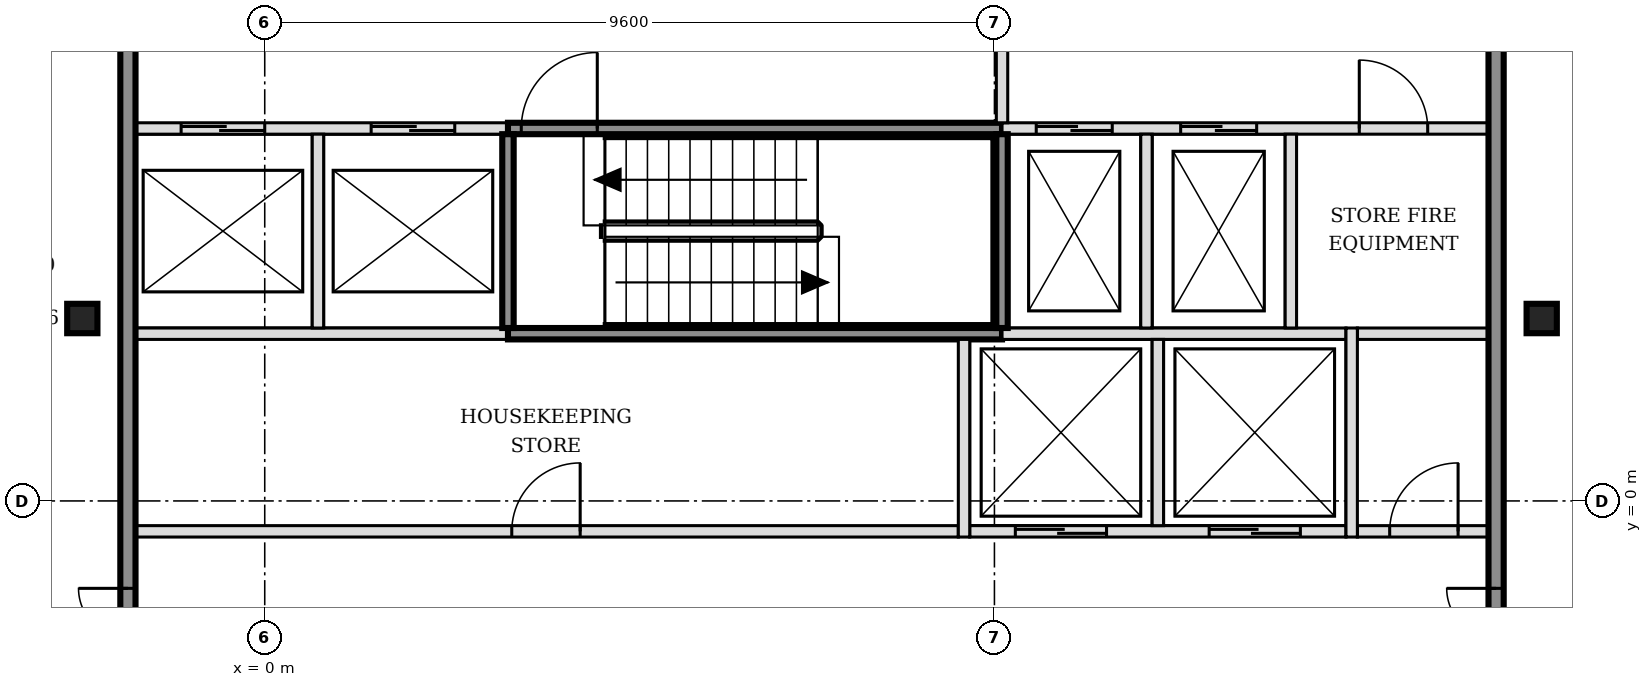
"""IFC4 building model, lengths in metres.
Left out: names, types, materials, properties, quantities, classifications, styles, units other than length and angle.
Written with IfcOpenShell. Run it as: python <this file> out.ifc"""

import sys

from ifc_helpers import new_model, si_unit, direction, frame, frame_2d, origin, origin_2d, place, context, subcontext, project, spatial, rectangle, i_section, extrude, element, fill, save


model = new_model("IFC4")
c1 = context("Model", 3, precision=1e-05, world=origin(), true_north=direction((0.0, 1.0)))
c2 = subcontext(c1, "Body", "Model", "MODEL_VIEW")
j1 = project(units=[si_unit("LENGTHUNIT", "METRE"), si_unit("PLANEANGLEUNIT", "RADIAN")], contexts=[c1])
p1 = place(None, origin())
s1 = spatial("IfcSite", under=j1, at=p1, CompositionType="ELEMENT")
p2 = place(p1, origin())
s2 = spatial("IfcBuilding", under=s1, at=p2, CompositionType="ELEMENT")
p3 = place(p2, frame((0.0, 0.0, 250.2)))
s3 = spatial("IfcBuildingStorey", under=s2, at=p3, CompositionType="ELEMENT", Elevation=250.2)
for number, where, z_axis, x_axis in (
    (1, (-2.4, 2.4, -0.15), (0.0, 0.0, 1.0), (1.0, 0.0, 0.0)),
    (2, (16.8, 2.4, -0.15), (0.0, 0.0, 1.0), (1.0, 0.0, 0.0)),
):
    element("IfcColumn", number, at=place(p3, frame(where, z_axis=z_axis, x_axis=x_axis)), inside=s3, PredefinedType="COLUMN", context=c2, shape_type="SweptSolid", body=[
        extrude(i_section(OverallWidth=0.398, OverallDepth=0.387, WebThickness=0.021, FlangeThickness=0.033, FilletRadius=0.015, at=origin_2d()), origin(), (0.0, 0.0, 1.0), 3.6),
    ])
p4 = place(p3, frame((-1.7, -0.4, 0.0), z_axis=(0.0, 0.0, 1.0), x_axis=(1.0, 0.0, 0.0)))
e3 = element("IfcWall", 3, at=p4, inside=s3, PredefinedType="PARTITIONING", context=c2, shape_type="SweptSolid", body=[
    extrude(rectangle(XDim=10.825, YDim=0.15, at=frame_2d((5.413, 0.0))), origin(), (0.0, 0.0, 1.0), 3.45),
])
p5 = place(p4, frame((4.95, 0.0, 0.0)))
e4 = element("IfcOpeningElement", 4, at=p5, cuts=e3, PredefinedType="OPENING", context=c2, shape_type="SweptSolid", body=[
    extrude(rectangle(XDim=0.9, YDim=2.1, at=frame_2d((0.45, 1.05))), frame((0.0, 0.085, 0.0), z_axis=(0.0, -1.0, 0.0), x_axis=(1.0, 0.0, 0.0)), (0.0, 0.0, 1.0), 0.17),
])
p6 = place(p3, frame((9.275, -0.4, 0.0), z_axis=(0.0, 0.0, 1.0), x_axis=(1.0, 0.0, 0.0)))
e5 = element("IfcWall", 5, at=p6, inside=s3, PredefinedType="SOLIDWALL", context=c2, shape_type="SweptSolid", body=[
    extrude(rectangle(XDim=4.95, YDim=0.15, at=frame_2d((2.475, 0.0))), origin(), (0.0, 0.0, 1.0), 3.45),
])
p7 = place(p6, frame((0.6, 0.0, 0.0)))
e6 = element("IfcOpeningElement", 6, at=p7, cuts=e5, PredefinedType="OPENING", context=c2, shape_type="SweptSolid", body=[
    extrude(rectangle(XDim=1.2, YDim=2.1, at=frame_2d((0.6, 1.05))), frame((0.0, 0.085, 0.0), z_axis=(0.0, -1.0, 0.0), x_axis=(1.0, 0.0, 0.0)), (0.0, 0.0, 1.0), 0.17),
])
p8 = place(p6, frame((3.15, 0.0, 0.0)))
e7 = element("IfcOpeningElement", 7, at=p8, cuts=e5, PredefinedType="OPENING", context=c2, shape_type="SweptSolid", body=[
    extrude(rectangle(XDim=1.2, YDim=2.1, at=frame_2d((0.6, 1.05))), frame((0.0, 0.085, 0.0), z_axis=(0.0, -1.0, 0.0), x_axis=(1.0, 0.0, 0.0)), (0.0, 0.0, 1.0), 0.17),
])
p9 = place(p3, frame((14.375, -0.4, 0.0), z_axis=(0.0, 0.0, 1.0), x_axis=(1.0, 0.0, 0.0)))
e8 = element("IfcWall", 8, at=p9, inside=s3, PredefinedType="PARTITIONING", context=c2, shape_type="SweptSolid", body=[
    extrude(rectangle(XDim=1.725, YDim=0.15, at=frame_2d((0.863, 0.0))), origin(), (0.0, 0.0, 1.0), 3.45),
])
p10 = place(p9, frame((0.425, 0.0, 0.0)))
e9 = element("IfcOpeningElement", 9, at=p10, cuts=e8, PredefinedType="OPENING", context=c2, shape_type="SweptSolid", body=[
    extrude(rectangle(XDim=0.9, YDim=2.1, at=frame_2d((0.45, 1.05))), frame((0.0, 0.085, 0.0), z_axis=(0.0, -1.0, 0.0), x_axis=(1.0, 0.0, 0.0)), (0.0, 0.0, 1.0), 0.17),
])
p11 = place(p3, frame((-1.7, 2.2, 0.0), z_axis=(0.0, 0.0, 1.0), x_axis=(1.0, 0.0, 0.0)))
e10 = element("IfcWall", 10, at=p11, inside=s3, PredefinedType="SOLIDWALL", context=c2, shape_type="SweptSolid", body=[
    extrude(rectangle(XDim=4.9, YDim=0.15, at=frame_2d((2.45, 0.0))), origin(), (0.0, 0.0, 1.0), 3.45),
])
p12 = place(p3, frame((3.2, 2.2, 0.0), z_axis=(0.0, 0.0, 1.0), x_axis=(1.0, 0.0, 0.0)))
e11 = element("IfcWall", 11, at=p12, inside=s3, PredefinedType="SOLIDWALL", context=c2, shape_type="SweptSolid", body=[
    extrude(rectangle(XDim=6.5, YDim=0.15, at=frame_2d((3.25, 0.0))), origin(), (0.0, 0.0, 1.0), 3.45),
])
p13 = place(p3, frame((9.7, 2.2, 0.0), z_axis=(0.0, 0.0, 1.0), x_axis=(1.0, 0.0, 0.0)))
e12 = element("IfcWall", 12, at=p13, inside=s3, PredefinedType="SOLIDWALL", context=c2, shape_type="SweptSolid", body=[
    extrude(rectangle(XDim=4.525, YDim=0.15, at=frame_2d((2.263, 0.0))), origin(), (0.0, 0.0, 1.0), 3.45),
])
p14 = place(p3, frame((14.375, 2.2, 0.0), z_axis=(0.0, 0.0, 1.0), x_axis=(1.0, 0.0, 0.0)))
e13 = element("IfcWall", 13, at=p14, inside=s3, PredefinedType="PARTITIONING", context=c2, shape_type="SweptSolid", body=[
    extrude(rectangle(XDim=1.725, YDim=0.15, at=frame_2d((0.863, 0.0))), origin(), (0.0, 0.0, 1.0), 3.45),
])
p15 = place(p3, frame((-1.7, 4.9, 0.0), z_axis=(0.0, 0.0, 1.0), x_axis=(1.0, 0.0, 0.0)))
e14 = element("IfcWall", 14, at=p15, inside=s3, PredefinedType="SOLIDWALL", context=c2, shape_type="SweptSolid", body=[
    extrude(rectangle(XDim=4.9, YDim=0.15, at=frame_2d((2.45, 0.0))), origin(), (0.0, 0.0, 1.0), 3.45),
])
p16 = place(p15, frame((0.6, 0.0, 0.0)))
e15 = element("IfcOpeningElement", 15, at=p16, cuts=e14, PredefinedType="OPENING", context=c2, shape_type="SweptSolid", body=[
    extrude(rectangle(XDim=1.1, YDim=2.1, at=frame_2d((0.55, 1.05))), frame((0.0, 0.085, 0.0), z_axis=(0.0, -1.0, 0.0), x_axis=(1.0, 0.0, 0.0)), (0.0, 0.0, 1.0), 0.17),
])
p17 = place(p15, frame((3.1, 0.0, 0.0)))
e16 = element("IfcOpeningElement", 16, at=p17, cuts=e14, PredefinedType="OPENING", context=c2, shape_type="SweptSolid", body=[
    extrude(rectangle(XDim=1.1, YDim=2.1, at=frame_2d((0.55, 1.05))), frame((0.0, 0.085, 0.0), z_axis=(0.0, -1.0, 0.0), x_axis=(1.0, 0.0, 0.0)), (0.0, 0.0, 1.0), 0.17),
])
p18 = place(p3, frame((3.2, 4.9, 0.0), z_axis=(0.0, 0.0, 1.0), x_axis=(1.0, 0.0, 0.0)))
e17 = element("IfcWall", 17, at=p18, inside=s3, PredefinedType="SOLIDWALL", context=c2, shape_type="SweptSolid", body=[
    extrude(rectangle(XDim=6.5, YDim=0.15, at=frame_2d((3.25, 0.0))), origin(), (0.0, 0.0, 1.0), 3.45),
])
p19 = place(p18, frame((0.175, 0.0, 0.0)))
e18 = element("IfcOpeningElement", 18, at=p19, cuts=e17, PredefinedType="OPENING", context=c2, shape_type="SweptSolid", body=[
    extrude(rectangle(XDim=1.0, YDim=2.1, at=frame_2d((0.5, 1.05))), frame((0.0, 0.085, 0.0), z_axis=(0.0, -1.0, 0.0), x_axis=(1.0, 0.0, 0.0)), (0.0, 0.0, 1.0), 0.17),
])
p20 = place(p3, frame((9.7, 4.9, 0.0), z_axis=(0.0, 0.0, 1.0), x_axis=(1.0, 0.0, 0.0)))
e19 = element("IfcWall", 19, at=p20, inside=s3, PredefinedType="SOLIDWALL", context=c2, shape_type="SweptSolid", body=[
    extrude(rectangle(XDim=6.4, YDim=0.15, at=frame_2d((3.2, 0.0))), origin(), (0.0, 0.0, 1.0), 3.45),
])
p21 = place(p20, frame((0.45, 0.0, 0.0)))
e20 = element("IfcOpeningElement", 20, at=p21, cuts=e19, PredefinedType="OPENING", context=c2, shape_type="SweptSolid", body=[
    extrude(rectangle(XDim=1.0, YDim=2.1, at=frame_2d((0.5, 1.05))), frame((0.0, 0.085, 0.0), z_axis=(0.0, -1.0, 0.0), x_axis=(1.0, 0.0, 0.0)), (0.0, 0.0, 1.0), 0.17),
])
p22 = place(p20, frame((2.35, 0.0, 0.0)))
e21 = element("IfcOpeningElement", 21, at=p22, cuts=e19, PredefinedType="OPENING", context=c2, shape_type="SweptSolid", body=[
    extrude(rectangle(XDim=1.0, YDim=2.1, at=frame_2d((0.5, 1.05))), frame((0.0, 0.085, 0.0), z_axis=(0.0, -1.0, 0.0), x_axis=(1.0, 0.0, 0.0)), (0.0, 0.0, 1.0), 0.17),
])
p23 = place(p20, frame((4.7, 0.0, 0.0)))
e22 = element("IfcOpeningElement", 22, at=p23, cuts=e19, PredefinedType="OPENING", context=c2, shape_type="SweptSolid", body=[
    extrude(rectangle(XDim=0.9, YDim=2.1, at=frame_2d((0.45, 1.05))), frame((0.0, 0.085, 0.0), z_axis=(0.0, -1.0, 0.0), x_axis=(1.0, 0.0, 0.0)), (0.0, 0.0, 1.0), 0.17),
])
p24 = place(p3, frame((-1.8, -5.5, 0.0), z_axis=(0.0, 0.0, 1.0), x_axis=(0.0, 1.0, 0.0)))
e23 = element("IfcWall", 23, at=p24, inside=s3, PredefinedType="SOLIDWALL", context=c2, shape_type="SweptSolid", body=[
    extrude(rectangle(XDim=15.8, YDim=0.2, at=frame_2d((7.9, 0.0))), origin(), (0.0, 0.0, 1.0), 3.45),
])
p25 = place(p24, frame((3.05, 0.0, 0.0)))
e24 = element("IfcOpeningElement", 24, at=p25, cuts=e23, PredefinedType="OPENING", context=c2, shape_type="SweptSolid", body=[
    extrude(rectangle(XDim=1.3, YDim=2.1, at=frame_2d((0.65, 1.05))), frame((0.0, 0.11, 0.0), z_axis=(0.0, -1.0, 0.0), x_axis=(1.0, 0.0, 0.0)), (0.0, 0.0, 1.0), 0.22),
])
p26 = place(p24, frame((11.45, 0.0, 0.0)))
e25 = element("IfcOpeningElement", 25, at=p26, cuts=e23, PredefinedType="OPENING", context=c2, shape_type="SweptSolid", body=[
    extrude(rectangle(XDim=1.3, YDim=2.1, at=frame_2d((0.65, 1.05))), frame((0.0, 0.11, 0.0), z_axis=(0.0, -1.0, 0.0), x_axis=(1.0, 0.0, 0.0)), (0.0, 0.0, 1.0), 0.22),
])
for number, where, z_axis, x_axis in (
    (26, (0.7, 2.275, 0.0), (0.0, 0.0, 1.0), (0.0, 1.0, 0.0)),
    (27, (3.2, 2.275, 0.0), (0.0, 0.0, 1.0), (0.0, 1.0, 0.0)),
):
    element("IfcWall", number, at=place(p3, frame(where, z_axis=z_axis, x_axis=x_axis)), inside=s3, PredefinedType="SOLIDWALL", context=c2, shape_type="SweptSolid", body=[
        extrude(rectangle(XDim=2.55, YDim=0.15, at=frame_2d((1.275, 0.0))), origin(), (0.0, 0.0, 1.0), 3.45),
    ])
p27 = place(p3, frame((9.2, -0.475, 0.0), z_axis=(0.0, 0.0, 1.0), x_axis=(0.0, 1.0, 0.0)))
e28 = element("IfcWall", 28, at=p27, inside=s3, PredefinedType="SOLIDWALL", context=c2, shape_type="SweptSolid", body=[
    extrude(rectangle(XDim=2.6, YDim=0.15, at=frame_2d((1.3, 0.0))), origin(), (0.0, 0.0, 1.0), 3.45),
])
p28 = place(p3, frame((9.7, 2.275, 0.0), z_axis=(0.0, 0.0, 1.0), x_axis=(0.0, 1.0, 0.0)))
e29 = element("IfcWall", 29, at=p28, inside=s3, PredefinedType="SOLIDWALL", context=c2, shape_type="SweptSolid", body=[
    extrude(rectangle(XDim=2.55, YDim=0.15, at=frame_2d((1.275, 0.0))), origin(), (0.0, 0.0, 1.0), 3.45),
])
p29 = place(p3, frame((9.7, 4.975, 0.0), z_axis=(0.0, 0.0, 1.0), x_axis=(0.0, 1.0, 0.0)))
e30 = element("IfcWall", 30, at=p29, inside=s3, PredefinedType="SOLIDWALL", context=c2, shape_type="SweptSolid", body=[
    extrude(rectangle(XDim=2.45, YDim=0.15, at=frame_2d((1.225, 0.0))), origin(), (0.0, 0.0, 1.0), 3.45),
])
p30 = place(p3, frame((11.6, 2.275, 0.0), z_axis=(0.0, 0.0, 1.0), x_axis=(0.0, 1.0, 0.0)))
e31 = element("IfcWall", 31, at=p30, inside=s3, PredefinedType="SOLIDWALL", context=c2, shape_type="SweptSolid", body=[
    extrude(rectangle(XDim=2.55, YDim=0.15, at=frame_2d((1.275, 0.0))), origin(), (0.0, 0.0, 1.0), 3.45),
])
p31 = place(p3, frame((11.75, -0.325, 0.0), z_axis=(0.0, 0.0, 1.0), x_axis=(0.0, 1.0, 0.0)))
e32 = element("IfcWall", 32, at=p31, inside=s3, PredefinedType="SOLIDWALL", context=c2, shape_type="SweptSolid", body=[
    extrude(rectangle(XDim=2.45, YDim=0.15, at=frame_2d((1.225, 0.0))), origin(), (0.0, 0.0, 1.0), 3.45),
])
p32 = place(p3, frame((13.5, 2.275, 0.0), z_axis=(0.0, 0.0, 1.0), x_axis=(0.0, 1.0, 0.0)))
e33 = element("IfcWall", 33, at=p32, inside=s3, PredefinedType="SOLIDWALL", context=c2, shape_type="SweptSolid", body=[
    extrude(rectangle(XDim=2.55, YDim=0.15, at=frame_2d((1.275, 0.0))), origin(), (0.0, 0.0, 1.0), 3.45),
])
p33 = place(p3, frame((14.3, -0.475, 0.0), z_axis=(0.0, 0.0, 1.0), x_axis=(0.0, 1.0, 0.0)))
e34 = element("IfcWall", 34, at=p33, inside=s3, PredefinedType="SOLIDWALL", context=c2, shape_type="SweptSolid", body=[
    extrude(rectangle(XDim=2.75, YDim=0.15, at=frame_2d((1.375, 0.0))), origin(), (0.0, 0.0, 1.0), 3.45),
])
p34 = place(p3, frame((16.2, -5.5, 0.0), z_axis=(0.0, 0.0, 1.0), x_axis=(0.0, 1.0, 0.0)))
e35 = element("IfcWall", 35, at=p34, inside=s3, PredefinedType="SOLIDWALL", context=c2, shape_type="SweptSolid", body=[
    extrude(rectangle(XDim=15.8, YDim=0.2, at=frame_2d((7.9, 0.0))), origin(), (0.0, 0.0, 1.0), 3.45),
])
p35 = place(p34, frame((3.05, 0.0, 0.0)))
e36 = element("IfcOpeningElement", 36, at=p35, cuts=e35, PredefinedType="OPENING", context=c2, shape_type="SweptSolid", body=[
    extrude(rectangle(XDim=1.3, YDim=2.1, at=frame_2d((0.65, 1.05))), frame((0.0, 0.11, 0.0), z_axis=(0.0, -1.0, 0.0), x_axis=(1.0, 0.0, 0.0)), (0.0, 0.0, 1.0), 0.22),
])
p36 = place(p34, frame((11.45, 0.0, 0.0)))
e37 = element("IfcOpeningElement", 37, at=p36, cuts=e35, PredefinedType="OPENING", context=c2, shape_type="SweptSolid", body=[
    extrude(rectangle(XDim=1.3, YDim=2.1, at=frame_2d((0.65, 1.05))), frame((0.0, 0.11, 0.0), z_axis=(0.0, -1.0, 0.0), x_axis=(1.0, 0.0, 0.0)), (0.0, 0.0, 1.0), 0.22),
])
p37 = place(p7, origin())
e38 = element("IfcDoor", 38, at=p37, inside=s3, OperationType="DOUBLE_DOOR_SLIDING", PredefinedType="DOOR", context=c2, shape_type="SweptSolid", body=[
    extrude(rectangle(XDim=1.2, YDim=2.1, at=frame_2d((0.6, 1.05))), frame((0.0, 0.025, 0.0), z_axis=(0.0, -1.0, 0.0), x_axis=(1.0, 0.0, 0.0)), (0.0, 0.0, 1.0), 0.05),
])
fill(e6, e38)
p38 = place(p8, origin())
e39 = element("IfcDoor", 39, at=p38, inside=s3, OperationType="DOUBLE_DOOR_SLIDING", PredefinedType="DOOR", context=c2, shape_type="SweptSolid", body=[
    extrude(rectangle(XDim=1.2, YDim=2.1, at=frame_2d((0.6, 1.05))), frame((0.0, 0.025, 0.0), z_axis=(0.0, -1.0, 0.0), x_axis=(1.0, 0.0, 0.0)), (0.0, 0.0, 1.0), 0.05),
])
fill(e7, e39)
p39 = place(p16, origin())
e40 = element("IfcDoor", 40, at=p39, inside=s3, OperationType="DOUBLE_DOOR_SLIDING", PredefinedType="DOOR", context=c2, shape_type="SweptSolid", body=[
    extrude(rectangle(XDim=1.1, YDim=2.1, at=frame_2d((0.55, 1.05))), frame((0.0, 0.025, 0.0), z_axis=(0.0, -1.0, 0.0), x_axis=(1.0, 0.0, 0.0)), (0.0, 0.0, 1.0), 0.05),
])
fill(e15, e40)
p40 = place(p17, origin())
e41 = element("IfcDoor", 41, at=p40, inside=s3, OperationType="DOUBLE_DOOR_SLIDING", PredefinedType="DOOR", context=c2, shape_type="SweptSolid", body=[
    extrude(rectangle(XDim=1.1, YDim=2.1, at=frame_2d((0.55, 1.05))), frame((0.0, 0.025, 0.0), z_axis=(0.0, -1.0, 0.0), x_axis=(1.0, 0.0, 0.0)), (0.0, 0.0, 1.0), 0.05),
])
fill(e16, e41)
p41 = place(p21, origin())
e42 = element("IfcDoor", 42, at=p41, inside=s3, OperationType="DOUBLE_DOOR_SLIDING", PredefinedType="DOOR", context=c2, shape_type="SweptSolid", body=[
    extrude(rectangle(XDim=1.0, YDim=2.1, at=frame_2d((0.5, 1.05))), frame((0.0, 0.025, 0.0), z_axis=(0.0, -1.0, 0.0), x_axis=(1.0, 0.0, 0.0)), (0.0, 0.0, 1.0), 0.05),
])
fill(e20, e42)
p42 = place(p22, origin())
e43 = element("IfcDoor", 43, at=p42, inside=s3, OperationType="DOUBLE_DOOR_SLIDING", PredefinedType="DOOR", context=c2, shape_type="SweptSolid", body=[
    extrude(rectangle(XDim=1.0, YDim=2.1, at=frame_2d((0.5, 1.05))), frame((0.0, 0.025, 0.0), z_axis=(0.0, -1.0, 0.0), x_axis=(1.0, 0.0, 0.0)), (0.0, 0.0, 1.0), 0.05),
])
fill(e21, e43)
p43 = place(p19, origin())
e44 = element("IfcDoor", 44, at=p43, inside=s3, OperationType="SINGLE_SWING_RIGHT", PredefinedType="DOOR", context=c2, shape_type="SweptSolid", body=[
    extrude(rectangle(XDim=1.0, YDim=2.1, at=frame_2d((0.5, 1.05))), frame((0.0, 0.025, 0.0), z_axis=(0.0, -1.0, 0.0), x_axis=(1.0, 0.0, 0.0)), (0.0, 0.0, 1.0), 0.05),
])
fill(e18, e44)
p44 = place(p25, origin())
e45 = element("IfcDoor", 45, at=p44, inside=s3, OperationType="DOUBLE_DOOR_SINGLE_SWING", PredefinedType="DOOR", context=c2, shape_type="SweptSolid", body=[
    extrude(rectangle(XDim=1.3, YDim=2.1, at=frame_2d((0.65, 1.05))), frame((0.0, 0.025, 0.0), z_axis=(0.0, -1.0, 0.0), x_axis=(1.0, 0.0, 0.0)), (0.0, 0.0, 1.0), 0.05),
])
fill(e24, e45)
p45 = place(p35, origin())
e46 = element("IfcDoor", 46, at=p45, inside=s3, OperationType="DOUBLE_DOOR_SINGLE_SWING", PredefinedType="DOOR", context=c2, shape_type="SweptSolid", body=[
    extrude(rectangle(XDim=1.3, YDim=2.1, at=frame_2d((0.65, 1.05))), frame((0.0, 0.025, 0.0), z_axis=(0.0, -1.0, 0.0), x_axis=(1.0, 0.0, 0.0)), (0.0, 0.0, 1.0), 0.05),
])
fill(e36, e46)
p46 = place(p10, origin())
e47 = element("IfcDoor", 47, at=p46, inside=s3, OperationType="SINGLE_SWING_RIGHT", PredefinedType="DOOR", context=c2, shape_type="SweptSolid", body=[
    extrude(rectangle(XDim=0.9, YDim=2.1, at=frame_2d((0.45, 1.05))), frame((0.0, 0.025, 0.0), z_axis=(0.0, -1.0, 0.0), x_axis=(1.0, 0.0, 0.0)), (0.0, 0.0, 1.0), 0.05),
])
fill(e9, e47)
p47 = place(p23, origin())
e48 = element("IfcDoor", 48, at=p47, inside=s3, OperationType="SINGLE_SWING_LEFT", PredefinedType="DOOR", context=c2, shape_type="SweptSolid", body=[
    extrude(rectangle(XDim=0.9, YDim=2.1, at=frame_2d((0.45, 1.05))), frame((0.0, 0.025, 0.0), z_axis=(0.0, -1.0, 0.0), x_axis=(1.0, 0.0, 0.0)), (0.0, 0.0, 1.0), 0.05),
])
fill(e22, e48)
p48 = place(p5, origin())
e49 = element("IfcDoor", 49, at=p48, inside=s3, OperationType="SINGLE_SWING_RIGHT", PredefinedType="DOOR", context=c2, shape_type="SweptSolid", body=[
    extrude(rectangle(XDim=0.9, YDim=2.1, at=frame_2d((0.45, 1.05))), frame((0.0, 0.025, 0.0), z_axis=(0.0, -1.0, 0.0), x_axis=(1.0, 0.0, 0.0)), (0.0, 0.0, 1.0), 0.05),
])
fill(e4, e49)
save(model, sys.argv[1])
